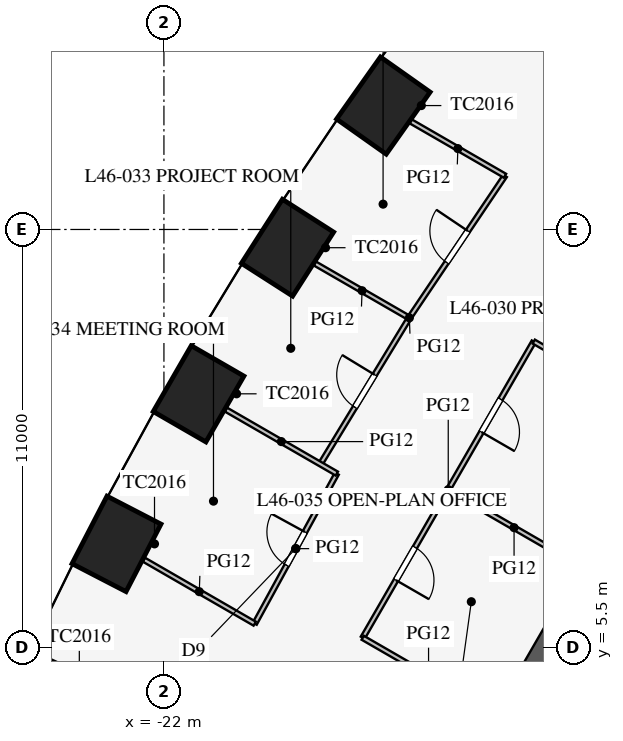
"""IFC4 building model, lengths in metres.
Left out: names, types, materials, properties, quantities, classifications, styles, units other than length and angle.
Written with IfcOpenShell. Run it as: python <this file> out.ifc"""

import sys

from ifc_helpers import new_model, si_unit, direction, frame, frame_2d, origin, origin_2d, place, context, subcontext, project, spatial, rectangle, extrude, element, fill, save


model = new_model("IFC4")
c1 = context("Model", 3, precision=1e-05, world=origin(), true_north=direction((0.0, 1.0)))
c2 = subcontext(c1, "Body", "Model", "MODEL_VIEW")
j1 = project(units=[si_unit("LENGTHUNIT", "METRE"), si_unit("PLANEANGLEUNIT", "RADIAN")], contexts=[c1])
p1 = place(None, origin())
s1 = spatial("IfcSite", under=j1, at=p1, CompositionType="ELEMENT")
p2 = place(p1, origin())
s2 = spatial("IfcBuilding", under=s1, at=p2, CompositionType="ELEMENT")
p3 = place(p2, frame((0.0, 0.0, 202.3)))
s3 = spatial("IfcBuildingStorey", under=s2, at=p3, CompositionType="ELEMENT", Elevation=202.3)
for number, where, z_axis, x_axis in (
    (1, (-16.227, 19.761, 0.0), (0.0, 0.0, 1.0), (-0.577, -0.816, 0.0)),
    (2, (-18.748, 16.02, 0.0), (0.0, 0.0, 1.0), (-0.539, -0.842, 0.0)),
    (3, (-21.088, 12.175, 0.0), (0.0, 0.0, 1.0), (-0.5, -0.866, 0.0)),
    (4, (-23.248, 8.226, 0.0), (0.0, 0.0, 1.0), (-0.46, -0.888, 0.0)),
    (5, (-25.227, 4.172, 0.0), (0.0, 0.0, 1.0), (-0.418, -0.908, 0.0)),
):
    element("IfcColumn", number, at=place(p3, frame(where, z_axis=z_axis, x_axis=x_axis)), inside=s3, PredefinedType="COLUMN", context=c2, shape_type="SweptSolid", body=[
        extrude(rectangle(XDim=2.0, YDim=1.6, at=origin_2d()), origin(), (0.0, 0.0, 1.0), 4.2),
    ])
p4 = place(p3, frame((-5.773, 16.0, 0.0), z_axis=(0.0, 0.0, 1.0), x_axis=(-0.500002442456, -0.866023993627, 0.0)))
e6 = element("IfcWall", 6, at=p4, inside=s3, PredefinedType="SHEAR", context=c2, shape_type="SweptSolid", body=[
    extrude(rectangle(XDim=21.939, YDim=0.8, at=frame_2d((10.97, 0.0))), origin(), (0.0, 0.0, 1.0), 4.2),
])
p5 = place(p4, frame((17.27, 0.0, 0.0)))
e7 = element("IfcOpeningElement", 7, at=p5, cuts=e6, PredefinedType="OPENING", context=c2, shape_type="SweptSolid", body=[
    extrude(rectangle(XDim=1.2, YDim=2.1, at=frame_2d((0.6, 1.05))), frame((0.0, 0.41, 0.0), z_axis=(0.0, -1.0, 0.0), x_axis=(1.0, 0.0, 0.0)), (0.0, 0.0, 1.0), 0.82),
])
p6 = place(p4, frame((3.47, 0.0, 0.0)))
e8 = element("IfcOpeningElement", 8, at=p6, cuts=e6, PredefinedType="OPENING", context=c2, shape_type="SweptSolid", body=[
    extrude(rectangle(XDim=1.2, YDim=2.1, at=frame_2d((0.6, 1.05))), frame((0.0, 0.41, 0.0), z_axis=(0.0, -1.0, 0.0), x_axis=(1.0, 0.0, 0.0)), (0.0, 0.0, 1.0), 0.82),
])
p7 = place(p3, frame((-14.519, 9.653, 0.0), z_axis=(0.0, 0.0, 1.0), x_axis=(-0.500013631625, -0.866017533419, 0.0)))
e9 = element("IfcWall", 9, at=p7, inside=s3, PredefinedType="PARTITIONING", context=c2, shape_type="SweptSolid", body=[
    extrude(rectangle(XDim=4.5, YDim=0.12, at=frame_2d((2.25, 0.0))), origin(), (0.0, 0.0, 1.0), 2.9),
])
p8 = place(p7, frame((1.75, 0.0, 0.15)))
e10 = element("IfcOpeningElement", 10, at=p8, cuts=e9, PredefinedType="OPENING", context=c2, shape_type="SweptSolid", body=[
    extrude(rectangle(XDim=1.0, YDim=2.1, at=frame_2d((0.5, 1.05))), frame((0.0, 0.07, 0.0), z_axis=(0.0, -1.0, 0.0), x_axis=(1.0, 0.0, 0.0)), (0.0, 0.0, 1.0), 0.14),
])
p9 = place(p3, frame((-12.269, 13.55, 0.0), z_axis=(0.0, 0.0, 1.0), x_axis=(-0.499990139034, -0.866031096941, 0.0)))
e11 = element("IfcWall", 11, at=p9, inside=s3, PredefinedType="PARTITIONING", context=c2, shape_type="SweptSolid", body=[
    extrude(rectangle(XDim=4.5, YDim=0.12, at=frame_2d((2.25, 0.0))), origin(), (0.0, 0.0, 1.0), 2.9),
])
p10 = place(p9, frame((1.75, 0.0, 0.15)))
e12 = element("IfcOpeningElement", 12, at=p10, cuts=e11, PredefinedType="OPENING", context=c2, shape_type="SweptSolid", body=[
    extrude(rectangle(XDim=1.0, YDim=2.1, at=frame_2d((0.5, 1.05))), frame((0.0, 0.07, 0.0), z_axis=(0.0, -1.0, 0.0), x_axis=(1.0, 0.0, 0.0)), (0.0, 0.0, 1.0), 0.14),
])
for number, where, z_axis, x_axis in (
    (13, (-13.305, 3.756, 0.0), (0.0, 0.0, 1.0), (-0.866, 0.5, 0.0)),
    (14, (-11.055, 7.653, 0.0), (0.0, 0.0, 1.0), (-0.866, 0.5, 0.0)),
    (15, (-8.805, 11.55, 0.0), (0.0, 0.0, 1.0), (-0.866, 0.5, 0.0)),
):
    element("IfcWall", number, at=place(p3, frame(where, z_axis=z_axis, x_axis=x_axis)), inside=s3, PredefinedType="PARTITIONING", context=c2, shape_type="SweptSolid", body=[
        extrude(rectangle(XDim=4.0, YDim=0.12, at=frame_2d((2.0, 0.0))), origin(), (0.0, 0.0, 1.0), 2.9),
    ])
p11 = place(p3, frame((-17.451, 10.075, 0.0), z_axis=(0.0, 0.0, 1.0), x_axis=(-0.479949984371, -0.877295852322, 0.0)))
e16 = element("IfcWall", 16, at=p11, inside=s3, PredefinedType="PARTITIONING", context=c2, shape_type="SweptSolid", body=[
    extrude(rectangle(XDim=4.501, YDim=0.12, at=frame_2d((2.25, 0.0))), origin(), (0.0, 0.0, 1.0), 2.9),
])
p12 = place(p11, frame((1.75, 0.0, 0.15)))
e17 = element("IfcOpeningElement", 17, at=p12, cuts=e16, PredefinedType="OPENING", context=c2, shape_type="SweptSolid", body=[
    extrude(rectangle(XDim=1.0, YDim=2.1, at=frame_2d((0.5, 1.05))), frame((0.0, 0.07, 0.0), z_axis=(0.0, -1.0, 0.0), x_axis=(1.0, 0.0, 0.0)), (0.0, 0.0, 1.0), 0.14),
])
p13 = place(p3, frame((-15.544, 14.171, 0.0), z_axis=(0.0, 0.0, 1.0), x_axis=(-0.519790350351, -0.85429385558, 0.0)))
e18 = element("IfcWall", 18, at=p13, inside=s3, PredefinedType="PARTITIONING", context=c2, shape_type="SweptSolid", body=[
    extrude(rectangle(XDim=4.501, YDim=0.12, at=frame_2d((2.25, 0.0))), origin(), (0.0, 0.0, 1.0), 2.9),
])
p14 = place(p13, frame((1.75, 0.0, 0.15)))
e19 = element("IfcOpeningElement", 19, at=p14, cuts=e18, PredefinedType="OPENING", context=c2, shape_type="SweptSolid", body=[
    extrude(rectangle(XDim=1.0, YDim=2.1, at=frame_2d((0.5, 1.05))), frame((0.0, 0.07, 0.0), z_axis=(0.0, -1.0, 0.0), x_axis=(1.0, 0.0, 0.0)), (0.0, 0.0, 1.0), 0.14),
])
p15 = place(p3, frame((-13.025, 17.912, 0.0), z_axis=(0.0, 0.0, 1.0), x_axis=(-0.55850386778, -0.829501916619, 0.0)))
e20 = element("IfcWall", 20, at=p15, inside=s3, PredefinedType="PARTITIONING", context=c2, shape_type="SweptSolid", body=[
    extrude(rectangle(XDim=4.511, YDim=0.12, at=frame_2d((2.255, 0.0))), origin(), (0.0, 0.0, 1.0), 2.9),
])
p16 = place(p15, frame((1.75, 0.0, 0.15)))
e21 = element("IfcOpeningElement", 21, at=p16, cuts=e20, PredefinedType="OPENING", context=c2, shape_type="SweptSolid", body=[
    extrude(rectangle(XDim=1.0, YDim=2.1, at=frame_2d((0.5, 1.05))), frame((0.0, 0.07, 0.0), z_axis=(0.0, -1.0, 0.0), x_axis=(1.0, 0.0, 0.0)), (0.0, 0.0, 1.0), 0.14),
])
p17 = place(p3, frame((-17.451, 10.075, 0.0), z_axis=(0.0, 0.0, 1.0), x_axis=(-0.866045641059, 0.499964946374, 0.0)))
e22 = element("IfcWall", 22, at=p17, inside=s3, PredefinedType="PARTITIONING", context=c2, shape_type="SweptSolid", body=[
    extrude(rectangle(XDim=3.37, YDim=0.12, at=frame_2d((1.685, 0.0))), origin(), (0.0, 0.0, 1.0), 2.9),
])
p18 = place(p3, frame((-19.611, 6.126, 0.0), z_axis=(0.0, 0.0, 1.0), x_axis=(-0.866031085144, 0.499990159468, 0.0)))
e23 = element("IfcWall", 23, at=p18, inside=s3, PredefinedType="PARTITIONING", context=c2, shape_type="SweptSolid", body=[
    extrude(rectangle(XDim=3.368, YDim=0.12, at=frame_2d((1.684, 0.0))), origin(), (0.0, 0.0, 1.0), 2.9),
])
p19 = place(p3, frame((-15.544, 14.171, 0.0), z_axis=(0.0, 0.0, 1.0), x_axis=(-0.865987130335, 0.500066285701, 0.0)))
e24 = element("IfcWall", 24, at=p19, inside=s3, PredefinedType="PARTITIONING", context=c2, shape_type="SweptSolid", body=[
    extrude(rectangle(XDim=2.868, YDim=0.12, at=frame_2d((1.434, 0.0))), origin(), (0.0, 0.0, 1.0), 2.9),
])
p20 = place(p3, frame((-13.025, 17.912, 0.0), z_axis=(0.0, 0.0, 1.0), x_axis=(-0.866009501729, 0.500027542156, 0.0)))
e25 = element("IfcWall", 25, at=p20, inside=s3, PredefinedType="PARTITIONING", context=c2, shape_type="SweptSolid", body=[
    extrude(rectangle(XDim=2.863, YDim=0.12, at=frame_2d((1.432, 0.0))), origin(), (0.0, 0.0, 1.0), 2.9),
])
p21 = place(p10, origin())
e26 = element("IfcDoor", 26, at=p21, inside=s3, OperationType="SINGLE_SWING_RIGHT", PredefinedType="DOOR", context=c2, shape_type="SweptSolid", body=[
    extrude(rectangle(XDim=1.0, YDim=2.1, at=frame_2d((0.5, 1.05))), frame((0.0, 0.025, 0.0), z_axis=(0.0, -1.0, 0.0), x_axis=(1.0, 0.0, 0.0)), (0.0, 0.0, 1.0), 0.05),
])
fill(e12, e26)
p22 = place(p8, origin())
e27 = element("IfcDoor", 27, at=p22, inside=s3, OperationType="SINGLE_SWING_RIGHT", PredefinedType="DOOR", context=c2, shape_type="SweptSolid", body=[
    extrude(rectangle(XDim=1.0, YDim=2.1, at=frame_2d((0.5, 1.05))), frame((0.0, 0.025, 0.0), z_axis=(0.0, -1.0, 0.0), x_axis=(1.0, 0.0, 0.0)), (0.0, 0.0, 1.0), 0.05),
])
fill(e10, e27)
p23 = place(p16, frame((1.0, 0.0, 0.0), z_axis=(0.0, 0.0, 1.0), x_axis=(-1.0, 0.0, 0.0)))
e28 = element("IfcDoor", 28, at=p23, inside=s3, OperationType="SINGLE_SWING_RIGHT", PredefinedType="DOOR", context=c2, shape_type="SweptSolid", body=[
    extrude(rectangle(XDim=1.0, YDim=2.1, at=frame_2d((0.5, 1.05))), frame((0.0, 0.025, 0.0), z_axis=(0.0, -1.0, 0.0), x_axis=(1.0, 0.0, 0.0)), (0.0, 0.0, 1.0), 0.05),
])
fill(e21, e28)
p24 = place(p14, frame((1.0, 0.0, 0.0), z_axis=(0.0, 0.0, 1.0), x_axis=(-1.0, 0.0, 0.0)))
e29 = element("IfcDoor", 29, at=p24, inside=s3, OperationType="SINGLE_SWING_RIGHT", PredefinedType="DOOR", context=c2, shape_type="SweptSolid", body=[
    extrude(rectangle(XDim=1.0, YDim=2.1, at=frame_2d((0.5, 1.05))), frame((0.0, 0.025, 0.0), z_axis=(0.0, -1.0, 0.0), x_axis=(1.0, 0.0, 0.0)), (0.0, 0.0, 1.0), 0.05),
])
fill(e19, e29)
p25 = place(p12, frame((1.0, 0.0, 0.0), z_axis=(0.0, 0.0, 1.0), x_axis=(-1.0, 0.0, 0.0)))
e30 = element("IfcDoor", 30, at=p25, inside=s3, OperationType="SINGLE_SWING_RIGHT", PredefinedType="DOOR", context=c2, shape_type="SweptSolid", body=[
    extrude(rectangle(XDim=1.0, YDim=2.1, at=frame_2d((0.5, 1.05))), frame((0.0, 0.025, 0.0), z_axis=(0.0, -1.0, 0.0), x_axis=(1.0, 0.0, 0.0)), (0.0, 0.0, 1.0), 0.05),
])
fill(e17, e30)
save(model, sys.argv[1])
